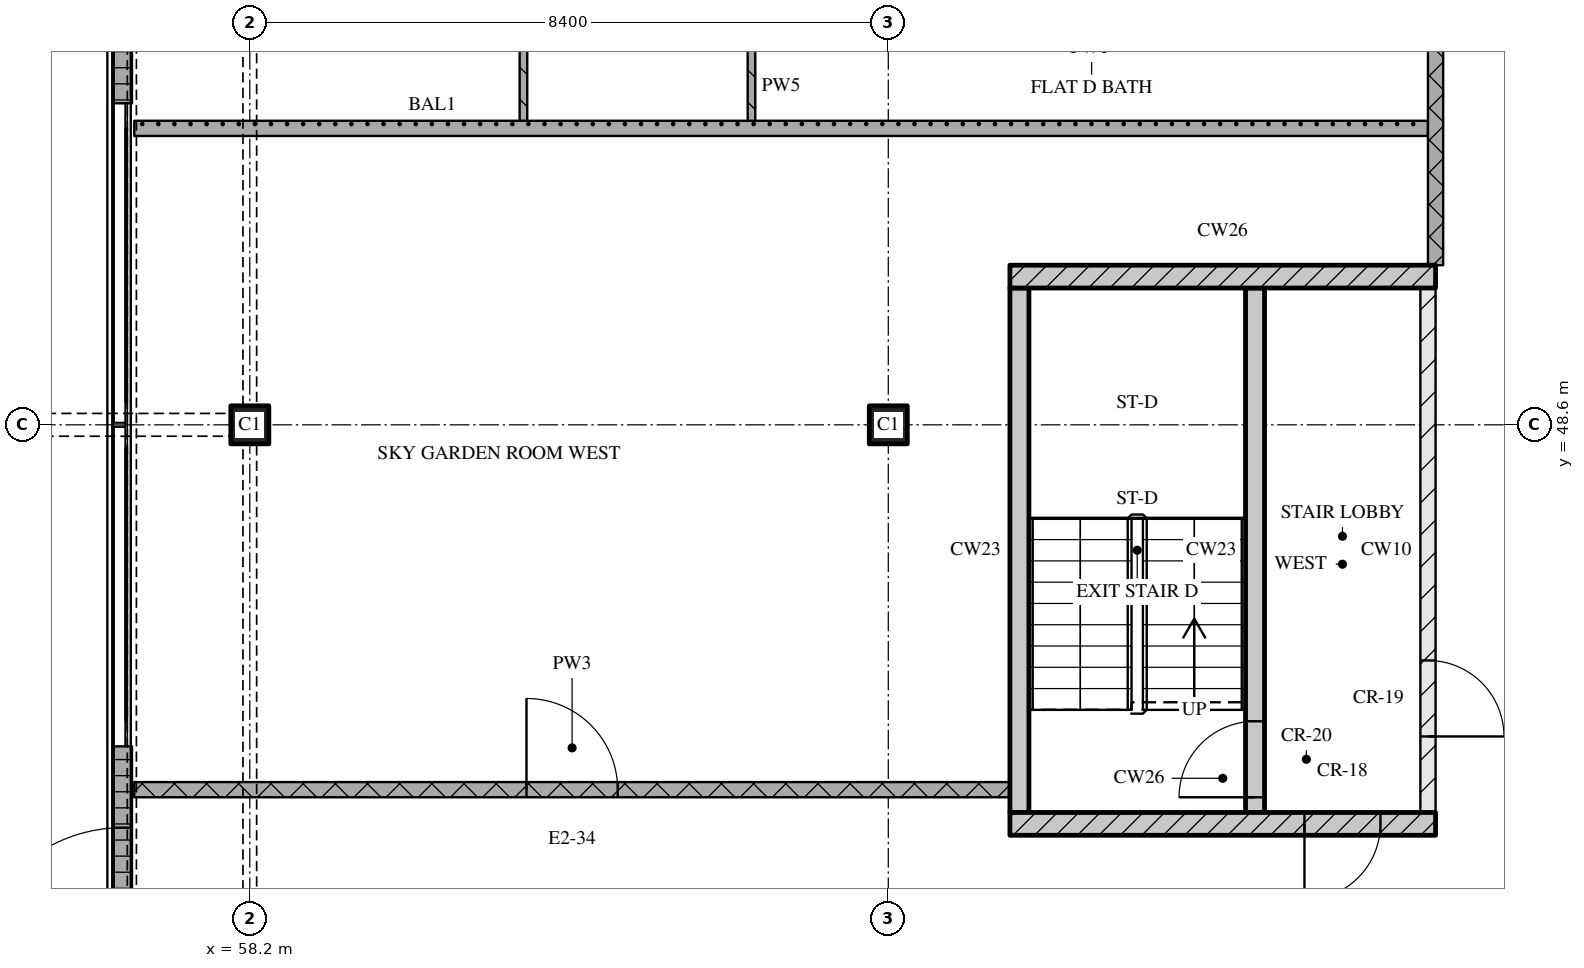
"""IFC4 building model, lengths in metres.
Left out: names, types, materials, properties, quantities, classifications, styles, units other than length and angle.
Written with IfcOpenShell. Run it as: python <this file> out.ifc"""

import sys

from ifc_helpers import new_model, si_unit, direction, frame, frame_2d, origin, origin_2d, place, context, subcontext, project, spatial, rectangle, extrude, element, fill, save


model = new_model("IFC4")
c1 = context("Model", 3, precision=1e-05, world=origin(), true_north=direction((0.0, 1.0)))
c2 = subcontext(c1, "Body", "Model", "MODEL_VIEW")
j1 = project(units=[si_unit("LENGTHUNIT", "METRE"), si_unit("PLANEANGLEUNIT", "RADIAN")], contexts=[c1])
p1 = place(None, origin())
s1 = spatial("IfcSite", under=j1, at=p1, CompositionType="ELEMENT")
p2 = place(p1, origin())
s2 = spatial("IfcBuilding", under=s1, at=p2, CompositionType="ELEMENT")
p3 = place(p2, frame((0.0, 0.0, 270.75)))
s3 = spatial("IfcBuildingStorey", under=s2, at=p3, CompositionType="ELEMENT", Elevation=270.75)
for number, where, z_axis, x_axis in (
    (1, (58.2, 48.6, 0.0), (0.0, 0.0, 1.0), (1.0, 0.0, 0.0)),
    (2, (66.6, 48.6, 0.0), (0.0, 0.0, 1.0), (1.0, 0.0, 0.0)),
):
    element("IfcColumn", number, at=place(p3, frame(where, z_axis=z_axis, x_axis=x_axis)), inside=s3, PredefinedType="COLUMN", context=c2, shape_type="SweptSolid", body=[
        extrude(rectangle(XDim=0.5, YDim=0.5, at=origin_2d()), origin(), (0.0, 0.0, 1.0), 3.6),
    ])
p4 = place(p3, frame((56.525, 52.83, 0.0), z_axis=(0.0, 0.0, 1.0), x_axis=(0.0, 1.0, 0.0)))
e3 = element("IfcWall", 3, at=p4, inside=s3, PredefinedType="SOLIDWALL", context=c2, shape_type="SweptSolid", body=[
    extrude(rectangle(XDim=4.14, YDim=0.25, at=frame_2d((2.07, 0.0))), origin(), (0.0, 0.0, 1.0), 3.32),
])
p5 = place(p4, frame((1.07, 0.0, 0.0)))
e4 = element("IfcOpeningElement", 4, at=p5, cuts=e3, PredefinedType="OPENING", context=c2, shape_type="SweptSolid", body=[
    extrude(rectangle(XDim=2.0, YDim=2.4, at=frame_2d((1.0, 1.2))), frame((0.0, 0.135, 0.0), z_axis=(0.0, -1.0, 0.0), x_axis=(1.0, 0.0, 0.0)), (0.0, 0.0, 1.0), 0.27),
])
p6 = place(p3, frame((56.525, 40.23, 0.0), z_axis=(0.0, 0.0, 1.0), x_axis=(0.0, 1.0, 0.0)))
e5 = element("IfcWall", 5, at=p6, inside=s3, PredefinedType="SOLIDWALL", context=c2, shape_type="SweptSolid", body=[
    extrude(rectangle(XDim=4.14, YDim=0.25, at=frame_2d((2.07, 0.0))), origin(), (0.0, 0.0, 1.0), 3.32),
])
p7 = place(p6, frame((1.07, 0.0, 0.0)))
e6 = element("IfcOpeningElement", 6, at=p7, cuts=e5, PredefinedType="OPENING", context=c2, shape_type="SweptSolid", body=[
    extrude(rectangle(XDim=2.0, YDim=2.4, at=frame_2d((1.0, 1.2))), frame((0.0, 0.135, 0.0), z_axis=(0.0, -1.0, 0.0), x_axis=(1.0, 0.0, 0.0)), (0.0, 0.0, 1.0), 0.27),
])
p8 = place(p3, frame((68.2, 43.35, 0.0), z_axis=(0.0, 0.0, 1.0), x_axis=(1.0, 0.0, 0.0)))
e7 = element("IfcWall", 7, at=p8, inside=s3, PredefinedType="SOLIDWALL", context=c2, shape_type="SweptSolid", body=[
    extrude(rectangle(XDim=5.6, YDim=0.3, at=frame_2d((2.8, 0.0))), origin(), (0.0, 0.0, 1.0), 3.32),
])
p9 = place(p8, frame((3.875, 0.0, 0.0)))
e8 = element("IfcOpeningElement", 8, at=p9, cuts=e7, PredefinedType="OPENING", context=c2, shape_type="SweptSolid", body=[
    extrude(rectangle(XDim=1.0, YDim=2.1, at=frame_2d((0.5, 1.05))), frame((0.0, 0.16, 0.0), z_axis=(0.0, -1.0, 0.0), x_axis=(1.0, 0.0, 0.0)), (0.0, 0.0, 1.0), 0.32),
])
p10 = place(p3, frame((68.325, 43.5, 0.0), z_axis=(0.0, 0.0, 1.0), x_axis=(0.0, 1.0, 0.0)))
e9 = element("IfcWall", 9, at=p10, inside=s3, PredefinedType="SOLIDWALL", context=c2, shape_type="SweptSolid", body=[
    extrude(rectangle(XDim=6.9, YDim=0.25, at=frame_2d((3.45, 0.0))), origin(), (0.0, 0.0, 1.0), 3.32),
])
p11 = place(p3, frame((71.425, 43.5, 0.0), z_axis=(0.0, 0.0, 1.0), x_axis=(0.0, 1.0, 0.0)))
e10 = element("IfcWall", 10, at=p11, inside=s3, PredefinedType="SOLIDWALL", context=c2, shape_type="SweptSolid", body=[
    extrude(rectangle(XDim=6.9, YDim=0.25, at=frame_2d((3.45, 0.0))), origin(), (0.0, 0.0, 1.0), 3.32),
])
p12 = place(p11, frame((0.2, 0.0, 0.0)))
e11 = element("IfcOpeningElement", 11, at=p12, cuts=e10, PredefinedType="OPENING", context=c2, shape_type="SweptSolid", body=[
    extrude(rectangle(XDim=1.0, YDim=2.1, at=frame_2d((0.5, 1.05))), frame((0.0, 0.135, 0.0), z_axis=(0.0, -1.0, 0.0), x_axis=(1.0, 0.0, 0.0)), (0.0, 0.0, 1.0), 0.27),
])
p13 = place(p3, frame((73.7, 43.5, 0.0), z_axis=(0.0, 0.0, 1.0), x_axis=(0.0, 1.0, 0.0)))
e12 = element("IfcWall", 12, at=p13, inside=s3, PredefinedType="PARTITIONING", context=c2, shape_type="SweptSolid", body=[
    extrude(rectangle(XDim=6.9, YDim=0.2, at=frame_2d((3.45, 0.0))), origin(), (0.0, 0.0, 1.0), 3.32),
])
p14 = place(p13, frame((1.0, 0.0, 0.0)))
e13 = element("IfcOpeningElement", 13, at=p14, cuts=e12, PredefinedType="OPENING", context=c2, shape_type="SweptSolid", body=[
    extrude(rectangle(XDim=1.0, YDim=2.1, at=frame_2d((0.5, 1.05))), frame((0.0, 0.11, 0.0), z_axis=(0.0, -1.0, 0.0), x_axis=(1.0, 0.0, 0.0)), (0.0, 0.0, 1.0), 0.22),
])
p15 = place(p3, frame((68.2, 50.55, 0.0), z_axis=(0.0, 0.0, 1.0), x_axis=(1.0, 0.0, 0.0)))
e14 = element("IfcWall", 14, at=p15, inside=s3, PredefinedType="SOLIDWALL", context=c2, shape_type="SweptSolid", body=[
    extrude(rectangle(XDim=5.6, YDim=0.3, at=frame_2d((2.8, 0.0))), origin(), (0.0, 0.0, 1.0), 3.32),
])
p16 = place(p3, frame((56.68, 43.8, 0.0), z_axis=(0.0, 0.0, 1.0), x_axis=(1.0, 0.0, 0.0)))
e15 = element("IfcWall", 15, at=p16, inside=s3, PredefinedType="PARTITIONING", context=c2, shape_type="SweptSolid", body=[
    extrude(rectangle(XDim=11.52, YDim=0.2, at=frame_2d((5.76, 0.0))), origin(), (0.0, 0.0, 1.0), 3.32),
])
p17 = place(p16, frame((5.16, 0.0, 0.0)))
e16 = element("IfcOpeningElement", 16, at=p17, cuts=e15, PredefinedType="OPENING", context=c2, shape_type="SweptSolid", body=[
    extrude(rectangle(XDim=1.2, YDim=2.1, at=frame_2d((0.6, 1.05))), frame((0.0, 0.11, 0.0), z_axis=(0.0, -1.0, 0.0), x_axis=(1.0, 0.0, 0.0)), (0.0, 0.0, 1.0), 0.22),
])
p18 = place(p3, frame((56.68, 52.5, 0.0), z_axis=(0.0, 0.0, 1.0), x_axis=(1.0, 0.0, 0.0)))
e17 = element("IfcWall", 17, at=p18, inside=s3, PredefinedType="PARTITIONING", context=c2, shape_type="SweptSolid", body=[
    extrude(rectangle(XDim=17.02, YDim=0.2, at=frame_2d((8.51, 0.0))), origin(), (0.0, 0.0, 1.0), 3.32),
])
p19 = place(p3, frame((61.8, 56.5, 0.0), z_axis=(0.0, 0.0, 1.0), x_axis=(0.0, -1.0, 0.0)))
e18 = element("IfcWall", 18, at=p19, inside=s3, PredefinedType="PARTITIONING", context=c2, shape_type="SweptSolid", body=[
    extrude(rectangle(XDim=3.9, YDim=0.1, at=frame_2d((1.95, 0.0))), origin(), (0.0, 0.0, 1.0), 3.32),
])
p20 = place(p3, frame((64.8, 54.55, 0.0), z_axis=(0.0, 0.0, 1.0), x_axis=(0.0, -1.0, 0.0)))
e19 = element("IfcWall", 19, at=p20, inside=s3, PredefinedType="PARTITIONING", context=c2, shape_type="SweptSolid", body=[
    extrude(rectangle(XDim=1.95, YDim=0.1, at=frame_2d((0.975, 0.0))), origin(), (0.0, 0.0, 1.0), 3.32),
])
p21 = place(p3, frame((73.8, 50.7, 0.0), z_axis=(0.0, 0.0, 1.0), x_axis=(0.0, 1.0, 0.0)))
e20 = element("IfcWall", 20, at=p21, inside=s3, PredefinedType="PARTITIONING", context=c2, shape_type="SweptSolid", body=[
    extrude(rectangle(XDim=8.0, YDim=0.2, at=frame_2d((4.0, 0.0))), origin(), (0.0, 0.0, 1.0), 3.32),
])
p22 = place(p21, frame((4.15, 0.0, 0.0)))
e21 = element("IfcOpeningElement", 21, at=p22, cuts=e20, PredefinedType="OPENING", context=c2, shape_type="SweptSolid", body=[
    extrude(rectangle(XDim=1.0, YDim=2.1, at=frame_2d((0.5, 1.05))), frame((0.0, 0.11, 0.0), z_axis=(0.0, -1.0, 0.0), x_axis=(1.0, 0.0, 0.0)), (0.0, 0.0, 1.0), 0.22),
])
p23 = place(p7, origin())
e22 = element("IfcDoor", 22, at=p23, inside=s3, OperationType="DOUBLE_DOOR_SINGLE_SWING", PredefinedType="DOOR", context=c2, shape_type="SweptSolid", body=[
    extrude(rectangle(XDim=2.0, YDim=2.4, at=frame_2d((1.0, 1.2))), frame((0.0, 0.025, 0.0), z_axis=(0.0, -1.0, 0.0), x_axis=(1.0, 0.0, 0.0)), (0.0, 0.0, 1.0), 0.05),
])
fill(e6, e22)
p24 = place(p9, origin())
e23 = element("IfcDoor", 23, at=p24, inside=s3, OperationType="SINGLE_SWING_RIGHT", PredefinedType="DOOR", context=c2, shape_type="SweptSolid", body=[
    extrude(rectangle(XDim=1.0, YDim=2.1, at=frame_2d((0.5, 1.05))), frame((0.0, 0.025, 0.0), z_axis=(0.0, -1.0, 0.0), x_axis=(1.0, 0.0, 0.0)), (0.0, 0.0, 1.0), 0.05),
])
fill(e8, e23)
p25 = place(p12, origin())
e24 = element("IfcDoor", 24, at=p25, inside=s3, OperationType="SINGLE_SWING_LEFT", PredefinedType="DOOR", context=c2, shape_type="SweptSolid", body=[
    extrude(rectangle(XDim=1.0, YDim=2.1, at=frame_2d((0.5, 1.05))), frame((0.0, 0.025, 0.0), z_axis=(0.0, -1.0, 0.0), x_axis=(1.0, 0.0, 0.0)), (0.0, 0.0, 1.0), 0.05),
])
fill(e11, e24)
p26 = place(p14, origin())
e25 = element("IfcDoor", 25, at=p26, inside=s3, OperationType="SINGLE_SWING_RIGHT", PredefinedType="DOOR", context=c2, shape_type="SweptSolid", body=[
    extrude(rectangle(XDim=1.0, YDim=2.1, at=frame_2d((0.5, 1.05))), frame((0.0, 0.025, 0.0), z_axis=(0.0, -1.0, 0.0), x_axis=(1.0, 0.0, 0.0)), (0.0, 0.0, 1.0), 0.05),
])
fill(e13, e25)
p27 = place(p17, origin())
e26 = element("IfcDoor", 26, at=p27, inside=s3, OperationType="SINGLE_SWING_LEFT", PredefinedType="DOOR", context=c2, shape_type="SweptSolid", body=[
    extrude(rectangle(XDim=1.2, YDim=2.1, at=frame_2d((0.6, 1.05))), frame((0.0, 0.025, 0.0), z_axis=(0.0, -1.0, 0.0), x_axis=(1.0, 0.0, 0.0)), (0.0, 0.0, 1.0), 0.05),
])
fill(e16, e26)
save(model, sys.argv[1])
